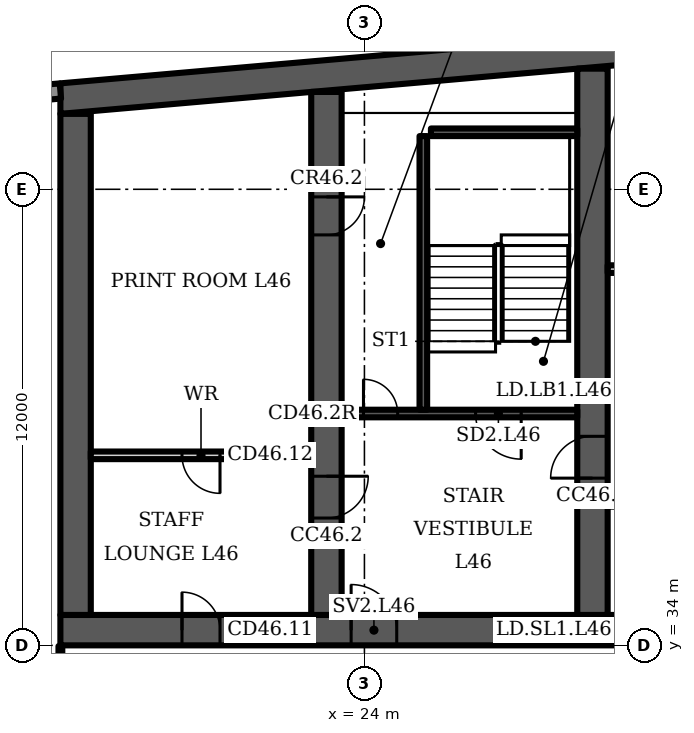
"""IFC4 building model, lengths in metres.
Left out: names, types, materials, properties, quantities, classifications, styles, units other than length and angle.
Written with IfcOpenShell. Run it as: python <this file> out.ifc"""

import sys

from ifc_helpers import new_model, si_unit, direction, frame, frame_2d, origin, place, context, subcontext, project, spatial, polyline, rectangle, outline, extrude, element, fill, save


model = new_model("IFC4")
c1 = context("Model", 3, precision=1e-05, world=origin(), true_north=direction((0.0, 1.0)))
c2 = subcontext(c1, "Body", "Model", "MODEL_VIEW")
j1 = project(units=[si_unit("LENGTHUNIT", "METRE"), si_unit("PLANEANGLEUNIT", "RADIAN")], contexts=[c1])
p1 = place(None, origin())
s1 = spatial("IfcSite", under=j1, at=p1, CompositionType="ELEMENT")
p2 = place(p1, origin())
s2 = spatial("IfcBuilding", under=s1, at=p2, CompositionType="ELEMENT")
p3 = place(p2, frame((0.0, 0.0, 187.9)))
s3 = spatial("IfcBuildingStorey", under=s2, at=p3, CompositionType="ELEMENT", Elevation=187.9)
p4 = place(p3, origin())
e1 = element("IfcWall", 1, at=p4, inside=s3, PredefinedType="SHEAR", context=c2, shape_type="SweptSolid", body=[
    extrude(outline(polyline([(16.0, 47.984), (37.0, 49.822), (58.0, 47.984), (58.0, 48.787), (37.0, 50.625), (16.0, 48.787), (16.0, 47.984)])), origin(), (0.0, 0.0, 1.0), 3.6),
])
p5 = place(p3, frame((16.0, 34.4, 0.0), z_axis=(0.0, 0.0, 1.0), x_axis=(1.0, 0.0, 0.0)))
e2 = element("IfcWall", 2, at=p5, inside=s3, PredefinedType="SHEAR", context=c2, shape_type="SweptSolid", body=[
    extrude(rectangle(XDim=42.0, YDim=0.8, at=frame_2d((21.0, 0.0))), origin(), (0.0, 0.0, 1.0), 3.6),
])
p6 = place(p5, frame((3.2, 0.0, 0.0)))
e3 = element("IfcOpeningElement", 3, at=p6, cuts=e2, PredefinedType="OPENING", context=c2, shape_type="SweptSolid", body=[
    extrude(rectangle(XDim=1.0, YDim=2.1, at=frame_2d((0.5, 1.05))), frame((0.0, 0.41, 0.0), z_axis=(0.0, -1.0, 0.0), x_axis=(1.0, 0.0, 0.0)), (0.0, 0.0, 1.0), 0.82),
])
p7 = place(p5, frame((7.65, 0.0, 0.0)))
e4 = element("IfcOpeningElement", 4, at=p7, cuts=e2, PredefinedType="OPENING", context=c2, shape_type="SweptSolid", body=[
    extrude(rectangle(XDim=1.2, YDim=2.1, at=frame_2d((0.6, 1.05))), frame((0.0, 0.41, 0.0), z_axis=(0.0, -1.0, 0.0), x_axis=(1.0, 0.0, 0.0)), (0.0, 0.0, 1.0), 0.82),
])
p8 = place(p5, frame((14.767, 0.0, 0.0)))
e5 = element("IfcOpeningElement", 5, at=p8, cuts=e2, PredefinedType="OPENING", context=c2, shape_type="SweptSolid", body=[
    extrude(rectangle(XDim=1.1, YDim=2.1, at=frame_2d((0.55, 1.05))), frame((0.0, 0.41, 0.0), z_axis=(0.0, -1.0, 0.0), x_axis=(1.0, 0.0, 0.0)), (0.0, 0.0, 1.0), 0.82),
])
p9 = place(p5, frame((19.133, 0.0, 0.0)))
e6 = element("IfcOpeningElement", 6, at=p9, cuts=e2, PredefinedType="OPENING", context=c2, shape_type="SweptSolid", body=[
    extrude(rectangle(XDim=1.1, YDim=2.1, at=frame_2d((0.55, 1.05))), frame((0.0, 0.41, 0.0), z_axis=(0.0, -1.0, 0.0), x_axis=(1.0, 0.0, 0.0)), (0.0, 0.0, 1.0), 0.82),
])
p10 = place(p5, frame((16.8, 0.0, 0.0)))
e7 = element("IfcOpeningElement", 7, at=p10, cuts=e2, PredefinedType="OPENING", context=c2, shape_type="SweptSolid", body=[
    extrude(rectangle(XDim=1.4, YDim=2.1, at=frame_2d((0.7, 1.05))), frame((0.0, 0.41, 0.0), z_axis=(0.0, -1.0, 0.0), x_axis=(1.0, 0.0, 0.0)), (0.0, 0.0, 1.0), 0.82),
])
p11 = place(p5, frame((21.767, 0.0, 0.0)))
e8 = element("IfcOpeningElement", 8, at=p11, cuts=e2, PredefinedType="OPENING", context=c2, shape_type="SweptSolid", body=[
    extrude(rectangle(XDim=1.1, YDim=2.1, at=frame_2d((0.55, 1.05))), frame((0.0, 0.41, 0.0), z_axis=(0.0, -1.0, 0.0), x_axis=(1.0, 0.0, 0.0)), (0.0, 0.0, 1.0), 0.82),
])
p12 = place(p5, frame((23.95, 0.0, 0.0)))
e9 = element("IfcOpeningElement", 9, at=p12, cuts=e2, PredefinedType="OPENING", context=c2, shape_type="SweptSolid", body=[
    extrude(rectangle(XDim=1.1, YDim=2.1, at=frame_2d((0.55, 1.05))), frame((0.0, 0.41, 0.0), z_axis=(0.0, -1.0, 0.0), x_axis=(1.0, 0.0, 0.0)), (0.0, 0.0, 1.0), 0.82),
])
p13 = place(p5, frame((26.133, 0.0, 0.0)))
e10 = element("IfcOpeningElement", 10, at=p13, cuts=e2, PredefinedType="OPENING", context=c2, shape_type="SweptSolid", body=[
    extrude(rectangle(XDim=1.1, YDim=2.1, at=frame_2d((0.55, 1.05))), frame((0.0, 0.41, 0.0), z_axis=(0.0, -1.0, 0.0), x_axis=(1.0, 0.0, 0.0)), (0.0, 0.0, 1.0), 0.82),
])
p14 = place(p5, frame((33.15, 0.0, 0.0)))
e11 = element("IfcOpeningElement", 11, at=p14, cuts=e2, PredefinedType="OPENING", context=c2, shape_type="SweptSolid", body=[
    extrude(rectangle(XDim=1.2, YDim=2.1, at=frame_2d((0.6, 1.05))), frame((0.0, 0.41, 0.0), z_axis=(0.0, -1.0, 0.0), x_axis=(1.0, 0.0, 0.0)), (0.0, 0.0, 1.0), 0.82),
])
p15 = place(p5, frame((35.817, 0.0, 0.0)))
e12 = element("IfcOpeningElement", 12, at=p15, cuts=e2, PredefinedType="OPENING", context=c2, shape_type="SweptSolid", body=[
    extrude(rectangle(XDim=1.0, YDim=2.1, at=frame_2d((0.5, 1.05))), frame((0.0, 0.41, 0.0), z_axis=(0.0, -1.0, 0.0), x_axis=(1.0, 0.0, 0.0)), (0.0, 0.0, 1.0), 0.82),
])
p16 = place(p5, frame((39.95, 0.0, 0.0)))
e13 = element("IfcOpeningElement", 13, at=p16, cuts=e2, PredefinedType="OPENING", context=c2, shape_type="SweptSolid", body=[
    extrude(rectangle(XDim=1.0, YDim=2.1, at=frame_2d((0.5, 1.05))), frame((0.0, 0.41, 0.0), z_axis=(0.0, -1.0, 0.0), x_axis=(1.0, 0.0, 0.0)), (0.0, 0.0, 1.0), 0.82),
])
p17 = place(p5, frame((37.767, 0.0, 0.0)))
e14 = element("IfcOpeningElement", 14, at=p17, cuts=e2, PredefinedType="OPENING", context=c2, shape_type="SweptSolid", body=[
    extrude(rectangle(XDim=1.4, YDim=2.1, at=frame_2d((0.7, 1.05))), frame((0.0, 0.41, 0.0), z_axis=(0.0, -1.0, 0.0), x_axis=(1.0, 0.0, 0.0)), (0.0, 0.0, 1.0), 0.82),
])
p18 = place(p3, frame((16.4, 34.8, 0.0), z_axis=(0.0, 0.0, 1.0), x_axis=(0.0, 1.0, 0.0)))
e15 = element("IfcWall", 15, at=p18, inside=s3, PredefinedType="SHEAR", context=c2, shape_type="SweptSolid", body=[
    extrude(rectangle(XDim=13.184, YDim=0.8, at=frame_2d((6.592, 0.0))), origin(), (0.0, 0.0, 1.0), 3.6),
])
p19 = place(p3, frame((23.0, 34.8, 0.0), z_axis=(0.0, 0.0, 1.0), x_axis=(0.0, 1.0, 0.0)))
e16 = element("IfcWall", 16, at=p19, inside=s3, PredefinedType="SHEAR", context=c2, shape_type="SweptSolid", body=[
    extrude(rectangle(XDim=13.762, YDim=0.8, at=frame_2d((6.881, 0.0))), origin(), (0.0, 0.0, 1.0), 3.6),
])
p20 = place(p19, frame((2.55, 0.0, 0.0)))
e17 = element("IfcOpeningElement", 17, at=p20, cuts=e16, PredefinedType="OPENING", context=c2, shape_type="SweptSolid", body=[
    extrude(rectangle(XDim=1.1, YDim=2.1, at=frame_2d((0.55, 1.05))), frame((0.0, 0.41, 0.0), z_axis=(0.0, -1.0, 0.0), x_axis=(1.0, 0.0, 0.0)), (0.0, 0.0, 1.0), 0.82),
])
p21 = place(p19, frame((10.0, 0.0, 0.0)))
e18 = element("IfcOpeningElement", 18, at=p21, cuts=e16, PredefinedType="OPENING", context=c2, shape_type="SweptSolid", body=[
    extrude(rectangle(XDim=1.0, YDim=2.1, at=frame_2d((0.5, 1.05))), frame((0.0, 0.41, 0.0), z_axis=(0.0, -1.0, 0.0), x_axis=(1.0, 0.0, 0.0)), (0.0, 0.0, 1.0), 0.82),
])
p22 = place(p3, frame((30.0, 34.8, 0.0), z_axis=(0.0, 0.0, 1.0), x_axis=(0.0, 1.0, 0.0)))
e19 = element("IfcWall", 19, at=p22, inside=s3, PredefinedType="SHEAR", context=c2, shape_type="SweptSolid", body=[
    extrude(rectangle(XDim=14.374, YDim=0.8, at=frame_2d((7.187, 0.0))), origin(), (0.0, 0.0, 1.0), 3.6),
])
p23 = place(p22, frame((3.6, 0.0, 0.0)))
e20 = element("IfcOpeningElement", 20, at=p23, cuts=e19, PredefinedType="OPENING", context=c2, shape_type="SweptSolid", body=[
    extrude(rectangle(XDim=1.1, YDim=2.1, at=frame_2d((0.55, 1.05))), frame((0.0, 0.41, 0.0), z_axis=(0.0, -1.0, 0.0), x_axis=(1.0, 0.0, 0.0)), (0.0, 0.0, 1.0), 0.82),
])
p24 = place(p3, frame((16.0, 48.587, 0.0), z_axis=(0.0, 0.0, 1.0), x_axis=(-0.996194, -0.087168, 0.0)))
e21 = element("IfcWall", 21, at=p24, inside=s3, PredefinedType="SOLIDWALL", context=c2, shape_type="SweptSolid", body=[
    extrude(rectangle(XDim=2.994, YDim=0.4, at=frame_2d((1.497, 0.0))), origin(), (0.0, 0.0, 1.0), 3.2),
])
p25 = place(p3, frame((16.8, 39.0, 0.0), z_axis=(0.0, 0.0, 1.0), x_axis=(1.0, 0.0, 0.0)))
e22 = element("IfcWall", 22, at=p25, inside=s3, PredefinedType="PARTITIONING", context=c2, shape_type="SweptSolid", body=[
    extrude(rectangle(XDim=5.8, YDim=0.2, at=frame_2d((2.9, 0.0))), origin(), (0.0, 0.0, 1.0), 3.2),
])
p26 = place(p25, frame((2.4, 0.0, 0.0)))
e23 = element("IfcOpeningElement", 23, at=p26, cuts=e22, PredefinedType="OPENING", context=c2, shape_type="SweptSolid", body=[
    extrude(rectangle(XDim=1.0, YDim=2.1, at=frame_2d((0.5, 1.05))), frame((0.0, 0.11, 0.0), z_axis=(0.0, -1.0, 0.0), x_axis=(1.0, 0.0, 0.0)), (0.0, 0.0, 1.0), 0.22),
])
p27 = place(p3, frame((23.4, 40.1, 0.0), z_axis=(0.0, 0.0, 1.0), x_axis=(1.0, 0.0, 0.0)))
e24 = element("IfcWall", 24, at=p27, inside=s3, PredefinedType="SHEAR", context=c2, shape_type="SweptSolid", body=[
    extrude(rectangle(XDim=6.2, YDim=0.2, at=frame_2d((3.1, 0.0))), origin(), (0.0, 0.0, 1.0), 3.2),
])
p28 = place(p27, frame((3.525, 0.0, 0.0)))
e25 = element("IfcOpeningElement", 25, at=p28, cuts=e24, PredefinedType="OPENING", context=c2, shape_type="SweptSolid", body=[
    extrude(rectangle(XDim=1.2, YDim=2.1, at=frame_2d((0.6, 1.05))), frame((0.0, 0.11, 0.0), z_axis=(0.0, -1.0, 0.0), x_axis=(1.0, 0.0, 0.0)), (0.0, 0.0, 1.0), 0.22),
])
p29 = place(p27, frame((0.575, 0.0, 0.0)))
e26 = element("IfcOpeningElement", 26, at=p29, cuts=e24, PredefinedType="OPENING", context=c2, shape_type="SweptSolid", body=[
    extrude(rectangle(XDim=0.9, YDim=2.1, at=frame_2d((0.45, 1.05))), frame((0.0, 0.11, 0.0), z_axis=(0.0, -1.0, 0.0), x_axis=(1.0, 0.0, 0.0)), (0.0, 0.0, 1.0), 0.22),
])
p30 = place(p3, frame((25.55, 40.2, 0.0), z_axis=(0.0, 0.0, 1.0), x_axis=(0.0, 1.0, 0.0)))
e27 = element("IfcWall", 27, at=p30, inside=s3, PredefinedType="SHEAR", context=c2, shape_type="SweptSolid", body=[
    extrude(rectangle(XDim=7.2, YDim=0.2, at=frame_2d((3.6, 0.0))), origin(), (0.0, 0.0, 1.0), 3.2),
])
p31 = place(p3, frame((25.75, 47.5, 0.0), z_axis=(0.0, 0.0, 1.0), x_axis=(1.0, 0.0, 0.0)))
e28 = element("IfcWall", 28, at=p31, inside=s3, PredefinedType="SHEAR", context=c2, shape_type="SweptSolid", body=[
    extrude(rectangle(XDim=3.85, YDim=0.2, at=frame_2d((1.925, 0.0))), origin(), (0.0, 0.0, 1.0), 3.2),
])
p32 = place(p3, frame((30.4, 40.7, 0.0), z_axis=(0.0, 0.0, 1.0), x_axis=(1.0, 0.0, 0.0)))
e29 = element("IfcWall", 29, at=p32, inside=s3, PredefinedType="PARTITIONING", context=c2, shape_type="SweptSolid", body=[
    extrude(rectangle(XDim=6.2, YDim=0.2, at=frame_2d((3.1, 0.0))), origin(), (0.0, 0.0, 1.0), 3.2),
])
p33 = place(p32, frame((0.367, 0.0, 0.0)))
e30 = element("IfcOpeningElement", 30, at=p33, cuts=e29, PredefinedType="OPENING", context=c2, shape_type="SweptSolid", body=[
    extrude(rectangle(XDim=1.1, YDim=2.1, at=frame_2d((0.55, 1.05))), frame((0.0, 0.11, 0.0), z_axis=(0.0, -1.0, 0.0), x_axis=(1.0, 0.0, 0.0)), (0.0, 0.0, 1.0), 0.22),
])
p34 = place(p32, frame((2.55, 0.0, 0.0)))
e31 = element("IfcOpeningElement", 31, at=p34, cuts=e29, PredefinedType="OPENING", context=c2, shape_type="SweptSolid", body=[
    extrude(rectangle(XDim=1.1, YDim=2.1, at=frame_2d((0.55, 1.05))), frame((0.0, 0.11, 0.0), z_axis=(0.0, -1.0, 0.0), x_axis=(1.0, 0.0, 0.0)), (0.0, 0.0, 1.0), 0.22),
])
p35 = place(p32, frame((4.733, 0.0, 0.0)))
e32 = element("IfcOpeningElement", 32, at=p35, cuts=e29, PredefinedType="OPENING", context=c2, shape_type="SweptSolid", body=[
    extrude(rectangle(XDim=1.1, YDim=2.1, at=frame_2d((0.55, 1.05))), frame((0.0, 0.11, 0.0), z_axis=(0.0, -1.0, 0.0), x_axis=(1.0, 0.0, 0.0)), (0.0, 0.0, 1.0), 0.22),
])
p36 = place(p3, origin())
e33 = element("IfcWall", 33, at=p36, inside=s3, PredefinedType="PARTITIONING", context=c2, shape_type="SweptSolid", body=[
    extrude(outline(polyline([(32.233, 37.65), (30.4, 37.65), (30.4, 37.85), (32.233, 37.85), (32.433, 37.85), (32.433, 34.8), (32.233, 34.8), (32.233, 37.65)])), origin(), (0.0, 0.0, 1.0), 3.2),
])
p37 = place(p3, origin())
e34 = element("IfcWall", 34, at=p37, inside=s3, PredefinedType="PARTITIONING", context=c2, shape_type="SweptSolid", body=[
    extrude(outline(polyline([(32.433, 40.8), (32.233, 40.8), (32.233, 43.8), (30.4, 43.8), (30.4, 44.0), (36.6, 44.0), (36.6, 43.8), (34.767, 43.8), (34.767, 40.8), (34.567, 40.8), (34.567, 43.8), (32.433, 43.8), (32.433, 40.8)])), origin(), (0.0, 0.0, 1.0), 3.2),
])
p38 = place(p3, frame((16.0, 30.5, 0.0), z_axis=(0.0, 0.0, 1.0), x_axis=(0.0, 1.0, 0.0)))
e35 = element("IfcWall", 35, at=p38, inside=s3, PredefinedType="PARTITIONING", context=c2, shape_type="SweptSolid", body=[
    extrude(rectangle(XDim=3.48, YDim=0.1, at=frame_2d((1.74, 0.0))), origin(), (0.0, 0.0, 1.0), 3.2),
])
p39 = place(p38, frame((0.08, 0.0, 0.0)))
e36 = element("IfcOpeningElement", 36, at=p39, cuts=e35, PredefinedType="OPENING", context=c2, shape_type="SweptSolid", body=[
    extrude(rectangle(XDim=1.0, YDim=2.1, at=frame_2d((0.5, 1.05))), frame((0.0, 0.06, 0.0), z_axis=(0.0, -1.0, 0.0), x_axis=(1.0, 0.0, 0.0)), (0.0, 0.0, 1.0), 0.12),
])
p40 = place(p6, origin())
e37 = element("IfcDoor", 37, at=p40, inside=s3, OperationType="SINGLE_SWING_LEFT", PredefinedType="DOOR", context=c2, shape_type="SweptSolid", body=[
    extrude(rectangle(XDim=1.0, YDim=2.1, at=frame_2d((0.5, 1.05))), frame((0.0, 0.4, 0.0), z_axis=(0.0, -1.0, 0.0), x_axis=(1.0, 0.0, 0.0)), (0.0, 0.0, 1.0), 0.8),
])
fill(e3, e37)
p41 = place(p26, origin())
e38 = element("IfcDoor", 38, at=p41, inside=s3, OperationType="SINGLE_SWING_RIGHT", PredefinedType="DOOR", context=c2, shape_type="SweptSolid", body=[
    extrude(rectangle(XDim=1.0, YDim=2.1, at=frame_2d((0.5, 1.05))), frame((0.0, 0.025, 0.0), z_axis=(0.0, -1.0, 0.0), x_axis=(1.0, 0.0, 0.0)), (0.0, 0.0, 1.0), 0.05),
])
fill(e23, e38)
p42 = place(p28, origin())
e39 = element("IfcDoor", 39, at=p42, inside=s3, OperationType="SINGLE_SWING_RIGHT", PredefinedType="DOOR", context=c2, shape_type="SweptSolid", body=[
    extrude(rectangle(XDim=1.2, YDim=2.1, at=frame_2d((0.6, 1.05))), frame((0.0, 0.025, 0.0), z_axis=(0.0, -1.0, 0.0), x_axis=(1.0, 0.0, 0.0)), (0.0, 0.0, 1.0), 0.05),
])
fill(e25, e39)
p43 = place(p29, origin())
e40 = element("IfcDoor", 40, at=p43, inside=s3, OperationType="SINGLE_SWING_LEFT", PredefinedType="DOOR", context=c2, shape_type="SweptSolid", body=[
    extrude(rectangle(XDim=0.9, YDim=2.1, at=frame_2d((0.45, 1.05))), frame((0.0, 0.025, 0.0), z_axis=(0.0, -1.0, 0.0), x_axis=(1.0, 0.0, 0.0)), (0.0, 0.0, 1.0), 0.05),
])
fill(e26, e40)
p44 = place(p7, origin())
e41 = element("IfcDoor", 41, at=p44, inside=s3, OperationType="SINGLE_SWING_LEFT", PredefinedType="DOOR", context=c2, shape_type="SweptSolid", body=[
    extrude(rectangle(XDim=1.2, YDim=2.1, at=frame_2d((0.6, 1.05))), frame((0.0, 0.025, 0.0), z_axis=(0.0, -1.0, 0.0), x_axis=(1.0, 0.0, 0.0)), (0.0, 0.0, 1.0), 0.05),
])
fill(e4, e41)
p45 = place(p20, origin())
e42 = element("IfcDoor", 42, at=p45, inside=s3, OperationType="SINGLE_SWING_RIGHT", PredefinedType="DOOR", context=c2, shape_type="SweptSolid", body=[
    extrude(rectangle(XDim=1.1, YDim=2.1, at=frame_2d((0.55, 1.05))), frame((0.0, 0.025, 0.0), z_axis=(0.0, -1.0, 0.0), x_axis=(1.0, 0.0, 0.0)), (0.0, 0.0, 1.0), 0.05),
])
fill(e17, e42)
p46 = place(p21, origin())
e43 = element("IfcDoor", 43, at=p46, inside=s3, OperationType="SINGLE_SWING_RIGHT", PredefinedType="DOOR", context=c2, shape_type="SweptSolid", body=[
    extrude(rectangle(XDim=1.0, YDim=2.1, at=frame_2d((0.5, 1.05))), frame((0.0, 0.4, 0.0), z_axis=(0.0, -1.0, 0.0), x_axis=(1.0, 0.0, 0.0)), (0.0, 0.0, 1.0), 0.8),
])
fill(e18, e43)
p47 = place(p23, origin())
e44 = element("IfcDoor", 44, at=p47, inside=s3, OperationType="SINGLE_SWING_LEFT", PredefinedType="DOOR", context=c2, shape_type="SweptSolid", body=[
    extrude(rectangle(XDim=1.1, YDim=2.1, at=frame_2d((0.55, 1.05))), frame((0.0, 0.025, 0.0), z_axis=(0.0, -1.0, 0.0), x_axis=(1.0, 0.0, 0.0)), (0.0, 0.0, 1.0), 0.05),
])
fill(e20, e44)
save(model, sys.argv[1])
